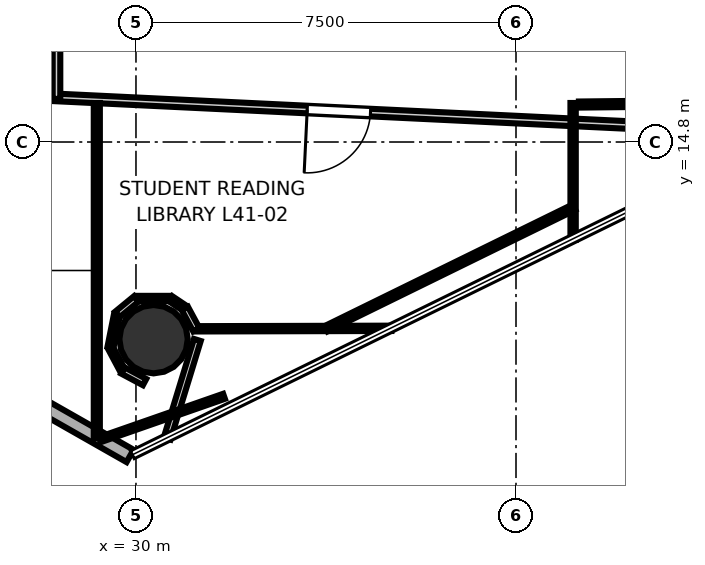
"""IFC4 building model, lengths in metres.
Left out: names, types, materials, properties, quantities, classifications, styles, units other than length and angle.
Written with IfcOpenShell. Run it as: python <this file> out.ifc"""

import sys

from ifc_helpers import new_model, si_unit, direction, frame, frame_2d, origin, origin_2d, place, context, subcontext, project, spatial, rectangle, hollow_circle, extrude, element, fill, save


model = new_model("IFC4")
c1 = context("Model", 3, precision=1e-05, world=origin(), true_north=direction((0.0, 1.0)))
c2 = subcontext(c1, "Body", "Model", "MODEL_VIEW")
j1 = project(units=[si_unit("LENGTHUNIT", "METRE"), si_unit("PLANEANGLEUNIT", "RADIAN")], contexts=[c1])
p1 = place(None, origin())
s1 = spatial("IfcSite", under=j1, at=p1, CompositionType="ELEMENT")
p2 = place(p1, origin())
s2 = spatial("IfcBuilding", under=s1, at=p2, CompositionType="ELEMENT")
p3 = place(p2, frame((0.0, 0.0, 162.4)))
s3 = spatial("IfcBuildingStorey", under=s2, at=p3, CompositionType="ELEMENT", Elevation=162.4)
p4 = place(p3, frame((30.347, 10.909, 0.0), z_axis=(0.0, 0.0, 1.0), x_axis=(1.0, 0.0, 0.0)))
e1 = element("IfcColumn", 1, at=p4, inside=s3, PredefinedType="COLUMN", context=c2, shape_type="SweptSolid", body=[
    extrude(hollow_circle(Radius=0.675, WallThickness=0.032, at=origin_2d()), origin(), (0.0, 0.0, 1.0), 3.7),
])
p5 = place(p3, frame((22.056, 13.056, 0.0), z_axis=(0.0, 0.0, 1.0), x_axis=(0.869262475314, -0.494350835956, 0.0)))
e2 = element("IfcWall", 2, at=p5, inside=s3, PredefinedType="SOLIDWALL", context=c2, shape_type="SweptSolid", body=[
    extrude(rectangle(XDim=9.004, YDim=0.28, at=frame_2d((4.502, 0.0))), origin(), (0.0, 0.0, 1.0), 3.52),
])
p6 = place(p5, frame((1.951, 0.0, 0.85)))
e3 = element("IfcOpeningElement", 3, at=p6, cuts=e2, PredefinedType="OPENING", context=c2, shape_type="SweptSolid", body=[
    extrude(rectangle(XDim=1.5, YDim=2.1, at=frame_2d((0.75, 1.05))), frame((0.0, 0.15, 0.0), z_axis=(0.0, -1.0, 0.0), x_axis=(1.0, 0.0, 0.0)), (0.0, 0.0, 1.0), 0.3),
])
p7 = place(p5, frame((5.553, 0.0, 0.85)))
e4 = element("IfcOpeningElement", 4, at=p7, cuts=e2, PredefinedType="OPENING", context=c2, shape_type="SweptSolid", body=[
    extrude(rectangle(XDim=1.5, YDim=2.1, at=frame_2d((0.75, 1.05))), frame((0.0, 0.15, 0.0), z_axis=(0.0, -1.0, 0.0), x_axis=(1.0, 0.0, 0.0)), (0.0, 0.0, 1.0), 0.3),
])
p8 = place(p3, frame((42.893, 14.982, 0.0), z_axis=(0.0, 0.0, 1.0), x_axis=(-0.9988389824, 0.048173511786, 0.0)))
e5 = element("IfcWall", 5, at=p8, inside=s3, PredefinedType="PARTITIONING", context=c2, shape_type="SweptSolid", body=[
    extrude(rectangle(XDim=14.51, YDim=0.15, at=frame_2d((7.255, 0.0))), origin(), (0.0, 0.0, 1.0), 2.84),
])
p9 = place(p8, frame((8.274, 0.0, 0.0)))
e6 = element("IfcOpeningElement", 6, at=p9, cuts=e5, PredefinedType="OPENING", context=c2, shape_type="SweptSolid", body=[
    extrude(rectangle(XDim=1.25, YDim=2.2, at=frame_2d((0.625, 1.1))), frame((0.0, 0.085, 0.0), z_axis=(0.0, -1.0, 0.0), x_axis=(1.0, 0.0, 0.0)), (0.0, 0.0, 1.0), 0.17),
])
p10 = place(p3, frame((28.431, 15.65, 0.0), z_axis=(0.0, 0.0, 1.0), x_axis=(0.0, 1.0, 0.0)))
e7 = element("IfcWall", 7, at=p10, inside=s3, PredefinedType="PARTITIONING", context=c2, shape_type="SweptSolid", body=[
    extrude(rectangle(XDim=2.4, YDim=0.15, at=frame_2d((1.2, 0.0))), origin(), (0.0, 0.0, 1.0), 2.84),
])
p11 = place(p3, frame((29.227, 15.57, 0.0), z_axis=(0.0, 0.0, 1.0), x_axis=(0.0, -1.0, 0.0)))
e8 = element("IfcWall", 8, at=p11, inside=s3, PredefinedType="PARTITIONING", context=c2, shape_type="SweptSolid", body=[
    extrude(rectangle(XDim=6.612, YDim=0.12, at=frame_2d((3.306, 0.0))), origin(), (0.0, 0.0, 1.0), 2.84),
])
p12 = place(p3, frame((38.644, 13.513, 0.0), z_axis=(0.0, 0.0, 1.0), x_axis=(-0.897915162587, -0.440168559526, 0.0)))
e9 = element("IfcWall", 9, at=p12, inside=s3, PredefinedType="PARTITIONING", context=c2, shape_type="SweptSolid", body=[
    extrude(rectangle(XDim=5.445, YDim=0.12, at=frame_2d((2.722, 0.0))), origin(), (0.0, 0.0, 1.0), 2.84),
])
p13 = place(p3, frame((35.04, 11.123, 0.0), z_axis=(0.0, 0.0, 1.0), x_axis=(-0.999996828806, -0.00251840793, 0.0)))
e10 = element("IfcWall", 10, at=p13, inside=s3, PredefinedType="PARTITIONING", context=c2, shape_type="SweptSolid", body=[
    extrude(rectangle(XDim=3.878, YDim=0.105, at=frame_2d((1.939, 0.0))), origin(), (0.0, 0.0, 1.0), 2.84),
])
p14 = place(p3, frame((31.19, 11.097, 0.0), z_axis=(0.0, 0.0, 1.0), x_axis=(-0.475420071565, 0.879758918996, 0.0)))
e11 = element("IfcWall", 11, at=p14, inside=s3, PredefinedType="PARTITIONING", context=c2, shape_type="SweptSolid", body=[
    extrude(rectangle(XDim=0.474, YDim=0.14, at=frame_2d((0.237, 0.0))), origin(), (0.0, 0.0, 1.0), 2.84),
])
p15 = place(p3, frame((30.955, 11.525, 0.0), z_axis=(0.0, 0.0, 1.0), x_axis=(-0.831126758744, 0.556083007203, 0.0)))
e12 = element("IfcWall", 12, at=p15, inside=s3, PredefinedType="PARTITIONING", context=c2, shape_type="SweptSolid", body=[
    extrude(rectangle(XDim=0.326, YDim=0.12, at=frame_2d((0.163, 0.0))), origin(), (0.0, 0.0, 1.0), 2.84),
])
p16 = place(p3, frame((30.667, 11.711, 0.0), z_axis=(0.0, 0.0, 1.0), x_axis=(-1.0, 0.0, 0.0)))
e13 = element("IfcWall", 13, at=p16, inside=s3, PredefinedType="PARTITIONING", context=c2, shape_type="SweptSolid", body=[
    extrude(rectangle(XDim=0.639, YDim=0.105, at=frame_2d((0.319, 0.0))), origin(), (0.0, 0.0, 1.0), 2.84),
])
p17 = place(p3, frame((30.008, 11.704, 0.0), z_axis=(0.0, 0.0, 1.0), x_axis=(-0.773193692611, -0.634169940715, 0.0)))
e14 = element("IfcWall", 14, at=p17, inside=s3, PredefinedType="PARTITIONING", context=c2, shape_type="SweptSolid", body=[
    extrude(rectangle(XDim=0.485, YDim=0.14, at=frame_2d((0.242, 0.0))), origin(), (0.0, 0.0, 1.0), 2.84),
])
p18 = place(p3, frame((29.622, 11.379, 0.0), z_axis=(0.0, 0.0, 1.0), x_axis=(-0.195234371211, -0.98075661624, 0.0)))
e15 = element("IfcWall", 15, at=p18, inside=s3, PredefinedType="PARTITIONING", context=c2, shape_type="SweptSolid", body=[
    extrude(rectangle(XDim=0.639, YDim=0.12, at=frame_2d((0.319, 0.0))), origin(), (0.0, 0.0, 1.0), 2.84),
])
p19 = place(p3, frame((29.501, 10.731, 0.0), z_axis=(0.0, 0.0, 1.0), x_axis=(0.471424550379, -0.88190639713, 0.0)))
e16 = element("IfcWall", 16, at=p19, inside=s3, PredefinedType="PARTITIONING", context=c2, shape_type="SweptSolid", body=[
    extrude(rectangle(XDim=0.485, YDim=0.105, at=frame_2d((0.242, 0.0))), origin(), (0.0, 0.0, 1.0), 2.84),
])
p20 = place(p3, frame((29.742, 10.291, 0.0), z_axis=(0.0, 0.0, 1.0), x_axis=(0.88190639713, -0.471424550379, 0.0)))
e17 = element("IfcWall", 17, at=p20, inside=s3, PredefinedType="PARTITIONING", context=c2, shape_type="SweptSolid", body=[
    extrude(rectangle(XDim=0.485, YDim=0.14, at=frame_2d((0.242, 0.0))), origin(), (0.0, 0.0, 1.0), 2.84),
])
p21 = place(p3, frame((30.615, 8.948, 0.0), z_axis=(0.0, 0.0, 1.0), x_axis=(0.292812756938, 0.956169801538, 0.0)))
e18 = element("IfcWall", 18, at=p21, inside=s3, PredefinedType="PARTITIONING", context=c2, shape_type="SweptSolid", body=[
    extrude(rectangle(XDim=2.035, YDim=0.14, at=frame_2d((1.018, 0.0))), origin(), (0.0, 0.0, 1.0), 2.84),
])
p22 = place(p3, frame((31.738, 9.781, 0.0), z_axis=(0.0, 0.0, 1.0), x_axis=(-0.944171617612, -0.329454027894, 0.0)))
e19 = element("IfcWall", 19, at=p22, inside=s3, PredefinedType="PARTITIONING", context=c2, shape_type="SweptSolid", body=[
    extrude(rectangle(XDim=2.597, YDim=0.105, at=frame_2d((1.298, 0.0))), origin(), (0.0, 0.0, 1.0), 2.84),
])
p23 = place(p3, frame((38.627, 15.57, 0.0), z_axis=(0.0, 0.0, 1.0), x_axis=(0.0, -1.0, 0.0)))
e20 = element("IfcWall", 20, at=p23, inside=s3, PredefinedType="PARTITIONING", context=c2, shape_type="SweptSolid", body=[
    extrude(rectangle(XDim=2.699, YDim=0.105, at=frame_2d((1.35, 0.0))), origin(), (0.0, 0.0, 1.0), 2.84),
])
p24 = place(p3, frame((38.742, 15.539, 0.0), z_axis=(0.0, 0.0, 1.0), x_axis=(0.999940745371, 0.010886034477, 0.0)))
e21 = element("IfcWall", 21, at=p24, inside=s3, PredefinedType="PARTITIONING", context=c2, shape_type="SweptSolid", body=[
    extrude(rectangle(XDim=5.427, YDim=0.12, at=frame_2d((2.714, 0.0))), origin(), (0.0, 0.0, 1.0), 2.84),
])
p25 = place(p9, origin())
e22 = element("IfcDoor", 22, at=p25, inside=s3, OperationType="SINGLE_SWING_RIGHT", PredefinedType="DOOR", context=c2, shape_type="SweptSolid", body=[
    extrude(rectangle(XDim=1.25, YDim=2.2, at=frame_2d((0.625, 1.1))), frame((0.0, 0.025, 0.0), z_axis=(0.0, -1.0, 0.0), x_axis=(1.0, 0.0, 0.0)), (0.0, 0.0, 1.0), 0.05),
])
fill(e6, e22)
save(model, sys.argv[1])
